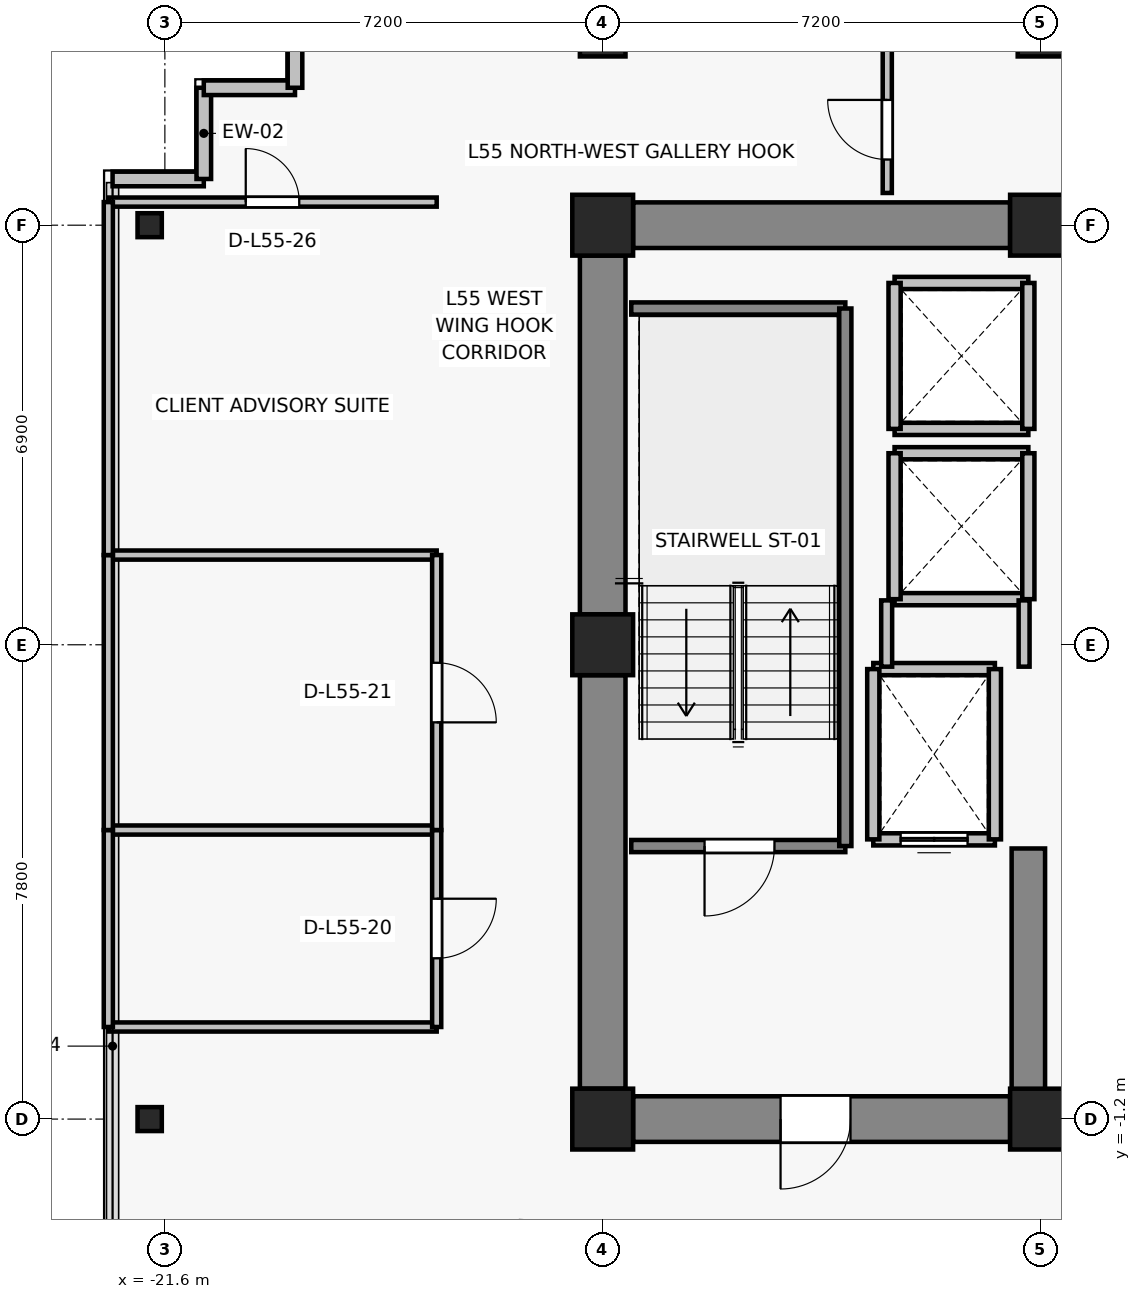
"""IFC4 building model, lengths in metres.
Left out: names, types, materials, properties, quantities, classifications, styles, units other than length and angle.
Written with IfcOpenShell. Run it as: python <this file> out.ifc"""

import sys

from ifc_helpers import new_model, si_unit, direction, frame, frame_2d, origin, origin_2d, place, context, subcontext, project, spatial, rectangle, i_section, extrude, source, transform, mapped, element, fill, save


model = new_model("IFC4")
c1 = context("Model", 3, precision=1e-05, world=origin(), true_north=direction((0.0, 1.0)))
c2 = subcontext(c1, "Body", "Model", "MODEL_VIEW")
j1 = project(units=[si_unit("LENGTHUNIT", "METRE"), si_unit("PLANEANGLEUNIT", "RADIAN")], contexts=[c1])
p1 = place(None, origin())
s1 = spatial("IfcSite", under=j1, at=p1, CompositionType="ELEMENT")
p2 = place(p1, origin())
s2 = spatial("IfcBuilding", under=s1, at=p2, CompositionType="ELEMENT")
p3 = place(p2, frame((0.0, 0.0, 195.7)))
s3 = spatial("IfcBuildingStorey", under=s2, at=p3, CompositionType="ELEMENT", Elevation=195.7)
for number, where, z_axis, x_axis in (
    (1, (-14.4, -1.2, 0.0), (0.0, 0.0, 1.0), (1.0, 0.0, 0.0)),
    (2, (-7.2, -1.2, 0.0), (0.0, 0.0, 1.0), (1.0, 0.0, 0.0)),
    (3, (-14.4, 6.6, 0.0), (0.0, 0.0, 1.0), (1.0, 0.0, 0.0)),
    (4, (-14.4, 13.5, 0.0), (0.0, 0.0, 1.0), (1.0, 0.0, 0.0)),
    (5, (-7.2, 13.5, 0.0), (0.0, 0.0, 1.0), (1.0, 0.0, 0.0)),
):
    element("IfcColumn", number, at=place(p3, frame(where, z_axis=z_axis, x_axis=x_axis)), inside=s3, PredefinedType="COLUMN", context=c2, shape_type="SweptSolid", body=[
        extrude(rectangle(XDim=1.0, YDim=1.0, at=origin_2d()), origin(), (0.0, 0.0, 1.0), 3.3),
    ])
for number, where, z_axis, x_axis in (
    (6, (-14.4, 16.65, 0.0), (0.0, 0.0, 1.0), (1.0, 0.0, 0.0)),
    (7, (-7.2, 16.65, 0.0), (0.0, 0.0, 1.0), (1.0, 0.0, 0.0)),
):
    element("IfcColumn", number, at=place(p3, frame(where, z_axis=z_axis, x_axis=x_axis)), inside=s3, PredefinedType="COLUMN", context=c2, shape_type="SweptSolid", body=[
        extrude(rectangle(XDim=0.75, YDim=0.75, at=origin_2d()), origin(), (0.0, 0.0, 1.0), 3.3),
    ])
for number, where, z_axis, x_axis in (
    (8, (-21.85, -1.2, 0.0), (0.0, 0.0, 1.0), (1.0, 0.0, 0.0)),
    (9, (-21.85, 13.5, 0.0), (0.0, 0.0, 1.0), (1.0, 0.0, 0.0)),
):
    element("IfcColumn", number, at=place(p3, frame(where, z_axis=z_axis, x_axis=x_axis)), inside=s3, PredefinedType="COLUMN", context=c2, shape_type="SweptSolid", body=[
        extrude(i_section(OverallWidth=0.399, OverallDepth=0.394, WebThickness=0.023, FlangeThickness=0.037, FilletRadius=0.015, at=origin_2d()), origin(), (0.0, 0.0, 1.0), 3.3),
    ])
p4 = place(p3, frame((-13.9, 13.5, 0.0), z_axis=(0.0, 0.0, 1.0), x_axis=(1.0, 0.0, 0.0)))
e10 = element("IfcWall", 10, at=p4, inside=s3, PredefinedType="SHEAR", context=c2, shape_type="SweptSolid", body=[
    extrude(rectangle(XDim=6.2, YDim=0.75, at=frame_2d((3.1, 0.0))), origin(), (0.0, 0.0, 1.0), 3.05),
])
p5 = place(p3, frame((-14.4, -0.7, 0.0), z_axis=(0.0, 0.0, 1.0), x_axis=(0.0, 1.0, 0.0)))
e11 = element("IfcWall", 11, at=p5, inside=s3, PredefinedType="SHEAR", context=c2, shape_type="SweptSolid", body=[
    extrude(rectangle(XDim=6.8, YDim=0.75, at=frame_2d((3.4, 0.0))), origin(), (0.0, 0.0, 1.0), 3.05),
])
p6 = place(p3, frame((-14.4, 7.1, 0.0), z_axis=(0.0, 0.0, 1.0), x_axis=(0.0, 1.0, 0.0)))
e12 = element("IfcWall", 12, at=p6, inside=s3, PredefinedType="SHEAR", context=c2, shape_type="SweptSolid", body=[
    extrude(rectangle(XDim=5.9, YDim=0.75, at=frame_2d((2.95, 0.0))), origin(), (0.0, 0.0, 1.0), 3.05),
])
p7 = place(p3, frame((-7.7, -1.2, 0.0), z_axis=(0.0, 0.0, 1.0), x_axis=(-1.0, 0.0, 0.0)))
e13 = element("IfcWall", 13, at=p7, inside=s3, PredefinedType="SHEAR", context=c2, shape_type="SweptSolid", body=[
    extrude(rectangle(XDim=6.2, YDim=0.75, at=frame_2d((3.1, 0.0))), origin(), (0.0, 0.0, 1.0), 3.05),
])
p8 = place(p7, frame((2.625, 0.0, 0.0)))
e14 = element("IfcOpeningElement", 14, at=p8, cuts=e13, PredefinedType="OPENING", context=c2, shape_type="SweptSolid", body=[
    extrude(rectangle(XDim=1.15, YDim=2.15, at=frame_2d((0.575, 1.075))), frame((0.0, 0.385, 0.0), z_axis=(0.0, -1.0, 0.0), x_axis=(1.0, 0.0, 0.0)), (0.0, 0.0, 1.0), 0.77),
])
p9 = place(p3, frame((-7.4, -0.825, 0.0), z_axis=(0.0, 0.0, 1.0), x_axis=(0.0, 1.0, 0.0)))
e15 = element("IfcWall", 15, at=p9, inside=s3, PredefinedType="SHEAR", context=c2, shape_type="SweptSolid", body=[
    extrude(rectangle(XDim=4.075, YDim=0.55, at=frame_2d((2.038, 0.0))), origin(), (0.0, 0.0, 1.0), 3.05),
])
for number, where, z_axis, x_axis in (
    (16, (-20.96, 14.26, 0.0), (0.0, 0.0, 1.0), (-1.0, 0.0, 0.0)),
    (17, (-20.96, 15.76, 0.0), (0.0, 0.0, 1.0), (0.0, -1.0, 0.0)),
    (18, (-19.46, 15.76, 0.0), (0.0, 0.0, 1.0), (-1.0, 0.0, 0.0)),
    (19, (-19.46, 17.26, 0.0), (0.0, 0.0, 1.0), (0.0, -1.0, 0.0)),
):
    element("IfcWall", number, at=place(p3, frame(where, z_axis=z_axis, x_axis=x_axis)), inside=s3, PredefinedType="SOLIDWALL", context=c2, shape_type="SweptSolid", body=[
        extrude(rectangle(XDim=1.5, YDim=0.24, at=frame_2d((0.75, 0.0))), origin(), (0.0, 0.0, 1.0), 3.05),
    ])
p10 = place(p3, frame((-7.95, 3.4, 0.0), z_axis=(0.0, 0.0, 1.0), x_axis=(-1.0, 0.0, 0.0)))
e20 = element("IfcWall", 20, at=p10, inside=s3, PredefinedType="SOLIDWALL", context=c2, shape_type="SweptSolid", body=[
    extrude(rectangle(XDim=2.0, YDim=0.2, at=frame_2d((1.0, 0.0))), origin(), (0.0, 0.0, 1.0), 3.05),
])
p11 = place(p10, frame((0.45, 0.0, 0.0)))
e21 = element("IfcOpeningElement", 21, at=p11, cuts=e20, PredefinedType="OPENING", context=c2, shape_type="SweptSolid", body=[
    extrude(rectangle(XDim=1.1, YDim=2.2, at=frame_2d((0.55, 1.1))), frame((0.0, 0.11, 0.0), z_axis=(0.0, -1.0, 0.0), x_axis=(1.0, 0.0, 0.0)), (0.0, 0.0, 1.0), 0.22),
])
p12 = place(p3, frame((-9.95, 6.2, 0.0), z_axis=(0.0, 0.0, 1.0), x_axis=(1.0, 0.0, 0.0)))
e22 = element("IfcWall", 22, at=p12, inside=s3, PredefinedType="SOLIDWALL", context=c2, shape_type="SweptSolid", body=[
    extrude(rectangle(XDim=2.0, YDim=0.2, at=frame_2d((1.0, 0.0))), origin(), (0.0, 0.0, 1.0), 3.05),
])
for number, where, z_axis, x_axis in (
    (23, (-9.95, 3.4, 0.0), (0.0, 0.0, 1.0), (0.0, 1.0, 0.0)),
    (24, (-7.95, 6.2, 0.0), (0.0, 0.0, 1.0), (0.0, -1.0, 0.0)),
):
    element("IfcWall", number, at=place(p3, frame(where, z_axis=z_axis, x_axis=x_axis)), inside=s3, PredefinedType="SOLIDWALL", context=c2, shape_type="SweptSolid", body=[
        extrude(rectangle(XDim=2.8, YDim=0.2, at=frame_2d((1.4, 0.0))), origin(), (0.0, 0.0, 1.0), 3.05),
    ])
for number, where, z_axis, x_axis in (
    (25, (-7.4, 7.35, 0.0), (0.0, 0.0, 1.0), (-1.0, 0.0, 0.0)),
    (26, (-9.6, 9.75, 0.0), (0.0, 0.0, 1.0), (1.0, 0.0, 0.0)),
):
    element("IfcWall", number, at=place(p3, frame(where, z_axis=z_axis, x_axis=x_axis)), inside=s3, PredefinedType="SOLIDWALL", context=c2, shape_type="SweptSolid", body=[
        extrude(rectangle(XDim=2.2, YDim=0.2, at=frame_2d((1.1, 0.0))), origin(), (0.0, 0.0, 1.0), 2.54),
    ])
p13 = place(p3, frame((-9.6, 7.35, 0.0), z_axis=(0.0, 0.0, 1.0), x_axis=(0.0, 1.0, 0.0)))
e27 = element("IfcWall", 27, at=p13, inside=s3, PredefinedType="SOLIDWALL", context=c2, shape_type="SweptSolid", body=[
    extrude(rectangle(XDim=2.4, YDim=0.2, at=frame_2d((1.2, 0.0))), origin(), (0.0, 0.0, 1.0), 3.05),
])
p14 = place(p3, frame((-7.4, 9.75, 0.0), z_axis=(0.0, 0.0, 1.0), x_axis=(0.0, -1.0, 0.0)))
e28 = element("IfcWall", 28, at=p14, inside=s3, PredefinedType="SOLIDWALL", context=c2, shape_type="SweptSolid", body=[
    extrude(rectangle(XDim=2.4, YDim=0.2, at=frame_2d((1.2, 0.0))), origin(), (0.0, 0.0, 1.0), 2.54),
])
for number, where, z_axis, x_axis in (
    (29, (-7.4, 10.15, 0.0), (0.0, 0.0, 1.0), (-1.0, 0.0, 0.0)),
    (30, (-9.6, 12.55, 0.0), (0.0, 0.0, 1.0), (1.0, 0.0, 0.0)),
):
    element("IfcWall", number, at=place(p3, frame(where, z_axis=z_axis, x_axis=x_axis)), inside=s3, PredefinedType="SOLIDWALL", context=c2, shape_type="SweptSolid", body=[
        extrude(rectangle(XDim=2.2, YDim=0.2, at=frame_2d((1.1, 0.0))), origin(), (0.0, 0.0, 1.0), 2.54),
    ])
p15 = place(p3, frame((-9.6, 10.15, 0.0), z_axis=(0.0, 0.0, 1.0), x_axis=(0.0, 1.0, 0.0)))
e31 = element("IfcWall", 31, at=p15, inside=s3, PredefinedType="SOLIDWALL", context=c2, shape_type="SweptSolid", body=[
    extrude(rectangle(XDim=2.4, YDim=0.2, at=frame_2d((1.2, 0.0))), origin(), (0.0, 0.0, 1.0), 3.05),
])
p16 = place(p3, frame((-7.4, 12.55, 0.0), z_axis=(0.0, 0.0, 1.0), x_axis=(0.0, -1.0, 0.0)))
e32 = element("IfcWall", 32, at=p16, inside=s3, PredefinedType="SOLIDWALL", context=c2, shape_type="SweptSolid", body=[
    extrude(rectangle(XDim=2.4, YDim=0.2, at=frame_2d((1.2, 0.0))), origin(), (0.0, 0.0, 1.0), 2.54),
])
p17 = place(p3, frame((-10.41, 3.29, 0.0), z_axis=(0.0, 0.0, 1.0), x_axis=(-1.0, 0.0, 0.0)))
e33 = element("IfcWall", 33, at=p17, inside=s3, PredefinedType="SOLIDWALL", context=c2, shape_type="SweptSolid", body=[
    extrude(rectangle(XDim=3.52, YDim=0.2, at=frame_2d((1.76, 0.0))), origin(), (0.0, 0.0, 1.0), 3.05),
])
p18 = place(p17, frame((1.165, 0.0, 0.0)))
e34 = element("IfcOpeningElement", 34, at=p18, cuts=e33, PredefinedType="OPENING", context=c2, shape_type="SweptSolid", body=[
    extrude(rectangle(XDim=1.15, YDim=2.15, at=frame_2d((0.575, 1.075))), frame((0.0, 0.11, 0.0), z_axis=(0.0, -1.0, 0.0), x_axis=(1.0, 0.0, 0.0)), (0.0, 0.0, 1.0), 0.22),
])
p19 = place(p3, frame((-13.93, 12.13, 0.0), z_axis=(0.0, 0.0, 1.0), x_axis=(1.0, 0.0, 0.0)))
e35 = element("IfcWall", 35, at=p19, inside=s3, PredefinedType="SOLIDWALL", context=c2, shape_type="SweptSolid", body=[
    extrude(rectangle(XDim=3.52, YDim=0.2, at=frame_2d((1.76, 0.0))), origin(), (0.0, 0.0, 1.0), 3.05),
])
p20 = place(p3, frame((-10.41, 12.13, 0.0), z_axis=(0.0, 0.0, 1.0), x_axis=(0.0, -1.0, 0.0)))
e36 = element("IfcWall", 36, at=p20, inside=s3, PredefinedType="SOLIDWALL", context=c2, shape_type="SweptSolid", body=[
    extrude(rectangle(XDim=8.84, YDim=0.2, at=frame_2d((4.42, 0.0))), origin(), (0.0, 0.0, 1.0), 3.05),
])
p21 = place(p3, frame((-9.73, 6.24, 0.0), z_axis=(0.0, 0.0, 1.0), x_axis=(0.0, 1.0, 0.0)))
e37 = element("IfcWall", 37, at=p21, inside=s3, PredefinedType="PARTITIONING", context=c2, shape_type="SweptSolid", body=[
    extrude(rectangle(XDim=1.09, YDim=0.18, at=frame_2d((0.545, 0.0))), origin(), (0.0, 0.0, 1.0), 3.05),
])
p22 = place(p3, frame((-7.47, 7.33, 0.0), z_axis=(0.0, 0.0, 1.0), x_axis=(0.0, -1.0, 0.0)))
e38 = element("IfcWall", 38, at=p22, inside=s3, PredefinedType="PARTITIONING", context=c2, shape_type="SweptSolid", body=[
    extrude(rectangle(XDim=1.09, YDim=0.18, at=frame_2d((0.545, 0.0))), origin(), (0.0, 0.0, 1.0), 2.54),
])
for number, where, z_axis, x_axis in (
    (39, (-17.13, 0.314, 0.0), (0.0, 0.0, 1.0), (-1.0, 0.0, 0.0)),
    (40, (-22.53, 3.553, 0.0), (0.0, 0.0, 1.0), (1.0, 0.0, 0.0)),
):
    element("IfcWall", number, at=place(p3, frame(where, z_axis=z_axis, x_axis=x_axis)), inside=s3, PredefinedType="PARTITIONING", context=c2, shape_type="SweptSolid", body=[
        extrude(rectangle(XDim=5.4, YDim=0.15, at=frame_2d((2.7, 0.0))), origin(), (0.0, 0.0, 1.0), 2.54),
    ])
p23 = place(p3, frame((-22.53, 0.314, 0.0), z_axis=(0.0, 0.0, 1.0), x_axis=(0.0, 1.0, 0.0)))
e41 = element("IfcWall", 41, at=p23, inside=s3, PredefinedType="PARTITIONING", context=c2, shape_type="SweptSolid", body=[
    extrude(rectangle(XDim=3.239, YDim=0.15, at=frame_2d((1.62, 0.0))), origin(), (0.0, 0.0, 1.0), 3.05),
])
p24 = place(p3, frame((-17.13, 3.553, 0.0), z_axis=(0.0, 0.0, 1.0), x_axis=(0.0, -1.0, 0.0)))
e42 = element("IfcWall", 42, at=p24, inside=s3, PredefinedType="PARTITIONING", context=c2, shape_type="SweptSolid", body=[
    extrude(rectangle(XDim=3.239, YDim=0.15, at=frame_2d((1.62, 0.0))), origin(), (0.0, 0.0, 1.0), 3.05),
])
p25 = place(p24, frame((1.129, 0.0, 0.0)))
e43 = element("IfcOpeningElement", 43, at=p25, cuts=e42, PredefinedType="OPENING", context=c2, shape_type="SweptSolid", body=[
    extrude(rectangle(XDim=0.98, YDim=2.15, at=frame_2d((0.49, 1.075))), frame((0.0, 0.085, 0.0), z_axis=(0.0, -1.0, 0.0), x_axis=(1.0, 0.0, 0.0)), (0.0, 0.0, 1.0), 0.17),
])
p26 = place(p3, frame((-22.53, 8.075, 0.0), z_axis=(0.0, 0.0, 1.0), x_axis=(1.0, 0.0, 0.0)))
e44 = element("IfcWall", 44, at=p26, inside=s3, PredefinedType="PARTITIONING", context=c2, shape_type="SweptSolid", body=[
    extrude(rectangle(XDim=5.4, YDim=0.15, at=frame_2d((2.7, 0.0))), origin(), (0.0, 0.0, 1.0), 2.54),
])
p27 = place(p3, frame((-22.53, 3.553, 0.0), z_axis=(0.0, 0.0, 1.0), x_axis=(0.0, 1.0, 0.0)))
e45 = element("IfcWall", 45, at=p27, inside=s3, PredefinedType="PARTITIONING", context=c2, shape_type="SweptSolid", body=[
    extrude(rectangle(XDim=4.522, YDim=0.15, at=frame_2d((2.261, 0.0))), origin(), (0.0, 0.0, 1.0), 3.05),
])
p28 = place(p3, frame((-17.13, 8.075, 0.0), z_axis=(0.0, 0.0, 1.0), x_axis=(0.0, -1.0, 0.0)))
e46 = element("IfcWall", 46, at=p28, inside=s3, PredefinedType="PARTITIONING", context=c2, shape_type="SweptSolid", body=[
    extrude(rectangle(XDim=4.522, YDim=0.15, at=frame_2d((2.261, 0.0))), origin(), (0.0, 0.0, 1.0), 3.05),
])
p29 = place(p28, frame((1.771, 0.0, 0.0)))
e47 = element("IfcOpeningElement", 47, at=p29, cuts=e46, PredefinedType="OPENING", context=c2, shape_type="SweptSolid", body=[
    extrude(rectangle(XDim=0.98, YDim=2.15, at=frame_2d((0.49, 1.075))), frame((0.0, 0.085, 0.0), z_axis=(0.0, -1.0, 0.0), x_axis=(1.0, 0.0, 0.0)), (0.0, 0.0, 1.0), 0.17),
])
p30 = place(p3, frame((-22.53, 13.88, 0.0), z_axis=(0.0, 0.0, 1.0), x_axis=(1.0, 0.0, 0.0)))
e48 = element("IfcWall", 48, at=p30, inside=s3, PredefinedType="PARTITIONING", context=c2, shape_type="SweptSolid", body=[
    extrude(rectangle(XDim=5.4, YDim=0.15, at=frame_2d((2.7, 0.0))), origin(), (0.0, 0.0, 1.0), 3.05),
])
p31 = place(p30, frame((2.26, 0.0, 0.0)))
e49 = element("IfcOpeningElement", 49, at=p31, cuts=e48, PredefinedType="OPENING", context=c2, shape_type="SweptSolid", body=[
    extrude(rectangle(XDim=0.88, YDim=2.1, at=frame_2d((0.44, 1.05))), frame((0.0, 0.085, 0.0), z_axis=(0.0, -1.0, 0.0), x_axis=(1.0, 0.0, 0.0)), (0.0, 0.0, 1.0), 0.17),
])
p32 = place(p3, frame((-22.53, 8.075, 0.0), z_axis=(0.0, 0.0, 1.0), x_axis=(0.0, 1.0, 0.0)))
e50 = element("IfcWall", 50, at=p32, inside=s3, PredefinedType="PARTITIONING", context=c2, shape_type="SweptSolid", body=[
    extrude(rectangle(XDim=5.805, YDim=0.15, at=frame_2d((2.902, 0.0))), origin(), (0.0, 0.0, 1.0), 3.05),
])
p33 = place(p3, frame((-9.72, 14.03, 0.0), z_axis=(0.0, 0.0, 1.0), x_axis=(0.0, 1.0, 0.0)))
e51 = element("IfcWall", 51, at=p33, inside=s3, PredefinedType="PARTITIONING", context=c2, shape_type="SweptSolid", body=[
    extrude(rectangle(XDim=3.3, YDim=0.15, at=frame_2d((1.65, 0.0))), origin(), (0.0, 0.0, 1.0), 2.54),
])
p34 = place(p33, frame((0.55, 0.0, 0.0)))
e52 = element("IfcOpeningElement", 52, at=p34, cuts=e51, PredefinedType="OPENING", context=c2, shape_type="SweptSolid", body=[
    extrude(rectangle(XDim=0.98, YDim=2.15, at=frame_2d((0.49, 1.075))), frame((0.0, 0.085, 0.0), z_axis=(0.0, -1.0, 0.0), x_axis=(1.0, 0.0, 0.0)), (0.0, 0.0, 1.0), 0.17),
])
m1 = source(origin(), c2, "Body", "SweptSolid", [
    extrude(rectangle(XDim=1.1, YDim=2.2, at=frame_2d((0.55, 1.1))), frame((0.0, 0.025, 0.0), z_axis=(0.0, -1.0, 0.0), x_axis=(1.0, 0.0, 0.0)), (0.0, 0.0, 1.0), 0.05),
])
p35 = place(p11, origin())
e53 = element("IfcDoor", 53, at=p35, inside=s3, OperationType="DOUBLE_DOOR_SLIDING", PredefinedType="DOOR", context=c2, shape_type="MappedRepresentation", body=[
    mapped(m1, transform((0.0, 0.0, 0.0), x_axis=(1.0, 0.0, 0.0), y_axis=(0.0, 1.0, 0.0), z_axis=(0.0, 0.0, 1.0), scale=1.0)),
])
fill(e21, e53)
m2 = source(origin(), c2, "Body", "SweptSolid", [
    extrude(rectangle(XDim=1.15, YDim=2.15, at=frame_2d((0.575, 1.075))), frame((0.0, 0.025, 0.0), z_axis=(0.0, -1.0, 0.0), x_axis=(1.0, 0.0, 0.0)), (0.0, 0.0, 1.0), 0.05),
])
p36 = place(p18, origin())
e54 = element("IfcDoor", 54, at=p36, inside=s3, OperationType="SINGLE_SWING_RIGHT", PredefinedType="DOOR", context=c2, shape_type="MappedRepresentation", body=[
    mapped(m2, transform((0.0, 0.0, 0.0), x_axis=(1.0, 0.0, 0.0), y_axis=(0.0, 1.0, 0.0), z_axis=(0.0, 0.0, 1.0), scale=1.0)),
])
fill(e34, e54)
p37 = place(p8, origin())
e55 = element("IfcDoor", 55, at=p37, inside=s3, OperationType="SINGLE_SWING_RIGHT", PredefinedType="DOOR", context=c2, shape_type="MappedRepresentation", body=[
    mapped(m2, transform((0.0, 0.0, 0.0), x_axis=(1.0, 0.0, 0.0), y_axis=(0.0, 1.0, 0.0), z_axis=(0.0, 0.0, 1.0), scale=1.0)),
])
fill(e14, e55)
m3 = source(origin(), c2, "Body", "SweptSolid", [
    extrude(rectangle(XDim=0.98, YDim=2.15, at=frame_2d((0.49, 1.075))), frame((0.0, 0.025, 0.0), z_axis=(0.0, -1.0, 0.0), x_axis=(1.0, 0.0, 0.0)), (0.0, 0.0, 1.0), 0.05),
])
p38 = place(p25, origin())
e56 = element("IfcDoor", 56, at=p38, inside=s3, OperationType="SINGLE_SWING_LEFT", PredefinedType="DOOR", context=c2, shape_type="MappedRepresentation", body=[
    mapped(m3, transform((0.0, 0.0, 0.0), x_axis=(1.0, 0.0, 0.0), y_axis=(0.0, 1.0, 0.0), z_axis=(0.0, 0.0, 1.0), scale=1.0)),
])
fill(e43, e56)
p39 = place(p29, origin())
e57 = element("IfcDoor", 57, at=p39, inside=s3, OperationType="SINGLE_SWING_RIGHT", PredefinedType="DOOR", context=c2, shape_type="MappedRepresentation", body=[
    mapped(m3, transform((0.0, 0.0, 0.0), x_axis=(1.0, 0.0, 0.0), y_axis=(0.0, 1.0, 0.0), z_axis=(0.0, 0.0, 1.0), scale=1.0)),
])
fill(e47, e57)
p40 = place(p34, origin())
e58 = element("IfcDoor", 58, at=p40, inside=s3, OperationType="SINGLE_SWING_RIGHT", PredefinedType="DOOR", context=c2, shape_type="MappedRepresentation", body=[
    mapped(m3, transform((0.0, 0.0, 0.0), x_axis=(1.0, 0.0, 0.0), y_axis=(0.0, 1.0, 0.0), z_axis=(0.0, 0.0, 1.0), scale=1.0)),
])
fill(e52, e58)
m4 = source(origin(), c2, "Body", "SweptSolid", [
    extrude(rectangle(XDim=0.88, YDim=2.1, at=frame_2d((0.44, 1.05))), frame((0.0, 0.025, 0.0), z_axis=(0.0, -1.0, 0.0), x_axis=(1.0, 0.0, 0.0)), (0.0, 0.0, 1.0), 0.05),
])
p41 = place(p31, origin())
e59 = element("IfcDoor", 59, at=p41, inside=s3, OperationType="SINGLE_SWING_LEFT", PredefinedType="DOOR", context=c2, shape_type="MappedRepresentation", body=[
    mapped(m4, transform((0.0, 0.0, 0.0), x_axis=(1.0, 0.0, 0.0), y_axis=(0.0, 1.0, 0.0), z_axis=(0.0, 0.0, 1.0), scale=1.0)),
])
fill(e49, e59)
save(model, sys.argv[1])
